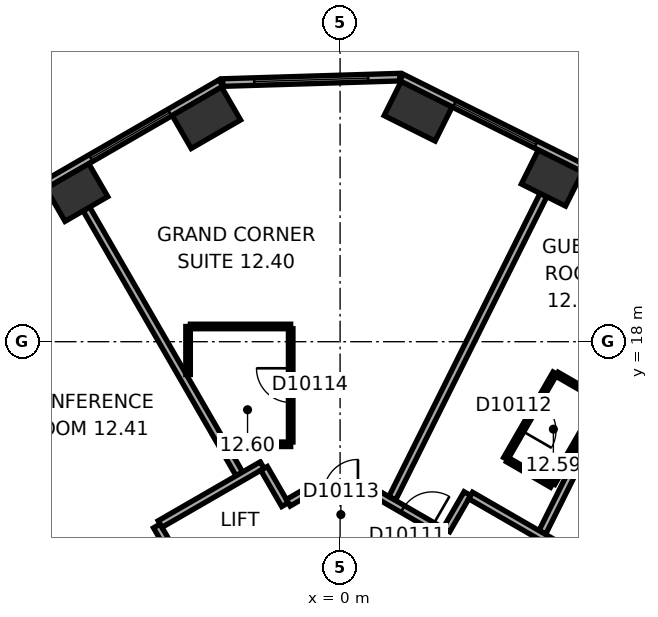
"""IFC4 building model, lengths in metres.
Left out: names, types, materials, properties, quantities, classifications, styles, units other than length and angle.
Written with IfcOpenShell. Run it as: python <this file> out.ifc"""

import sys

from ifc_helpers import new_model, si_unit, direction, frame, frame_2d, origin, origin_2d, place, context, subcontext, project, spatial, rectangle, extrude, element, fill, save


model = new_model("IFC4")
c1 = context("Model", 3, precision=1e-05, world=origin(), true_north=direction((0.0, 1.0)))
c2 = subcontext(c1, "Body", "Model", "MODEL_VIEW")
j1 = project(units=[si_unit("LENGTHUNIT", "METRE"), si_unit("PLANEANGLEUNIT", "RADIAN")], contexts=[c1])
p1 = place(None, origin())
s1 = spatial("IfcSite", under=j1, at=p1, CompositionType="ELEMENT")
p2 = place(p1, origin())
s2 = spatial("IfcBuilding", under=s1, at=p2, CompositionType="ELEMENT")
p3 = place(p2, frame((0.0, 0.0, 60.5)))
s3 = spatial("IfcBuildingStorey", under=s2, at=p3, CompositionType="ELEMENT", Elevation=60.5)
p4 = place(p3, frame((5.574, 22.306, 0.0), z_axis=(0.0, 0.0, 1.0), x_axis=(-0.894934361602, 0.44619781311, 0.0)))
e1 = element("IfcColumn", 1, at=p4, inside=s3, PredefinedType="COLUMN", context=c2, shape_type="SweptSolid", body=[
    extrude(rectangle(XDim=1.3, YDim=1.0, at=origin_2d()), origin(), (0.0, 0.0, 1.0), 3.3),
])
for number, where, z_axis, x_axis in (
    (2, (2.053, 24.062, 0.0), (0.0, 0.0, 1.0), (-0.895, 0.446, 0.0)),
    (3, (-3.518, 23.892, 0.0), (0.0, 0.0, 1.0), (-0.866, -0.5, 0.0)),
):
    element("IfcColumn", number, at=place(p3, frame(where, z_axis=z_axis, x_axis=x_axis)), inside=s3, PredefinedType="COLUMN", context=c2, shape_type="SweptSolid", body=[
        extrude(rectangle(XDim=1.5, YDim=1.0, at=origin_2d()), origin(), (0.0, 0.0, 1.0), 3.3),
    ])
p5 = place(p3, frame((-6.926, 21.925, 0.0), z_axis=(0.0, 0.0, 1.0), x_axis=(-0.866025403784, -0.5, 0.0)))
e4 = element("IfcColumn", 4, at=p5, inside=s3, PredefinedType="COLUMN", context=c2, shape_type="SweptSolid", body=[
    extrude(rectangle(XDim=1.3, YDim=1.0, at=origin_2d()), origin(), (0.0, 0.0, 1.0), 3.3),
])
p6 = place(p3, frame((20.63, 15.47, 0.0), z_axis=(0.0, 0.0, 1.0), x_axis=(-0.894934518609, 0.446197498203, 0.0)))
e5 = element("IfcWall", 5, at=p6, inside=s3, PredefinedType="STANDARD", context=c2, shape_type="SweptSolid", body=[
    extrude(rectangle(XDim=21.246, YDim=0.2, at=frame_2d((10.623, 0.0))), origin(), (0.0, 0.0, 1.0), 3.3),
])
p7 = place(p6, frame((1.553, 0.0, 0.8)))
e6 = element("IfcOpeningElement", 6, at=p7, cuts=e5, PredefinedType="OPENING", context=c2, shape_type="SweptSolid", body=[
    extrude(rectangle(XDim=2.4, YDim=1.7, at=frame_2d((1.2, 0.85))), frame((0.0, 0.11, 0.0), z_axis=(0.0, -1.0, 0.0), x_axis=(1.0, 0.0, 0.0)), (0.0, 0.0, 1.0), 0.22),
])
p8 = place(p6, frame((5.488, 0.0, 0.8)))
e7 = element("IfcOpeningElement", 7, at=p8, cuts=e5, PredefinedType="OPENING", context=c2, shape_type="SweptSolid", body=[
    extrude(rectangle(XDim=2.4, YDim=1.7, at=frame_2d((1.2, 0.85))), frame((0.0, 0.11, 0.0), z_axis=(0.0, -1.0, 0.0), x_axis=(1.0, 0.0, 0.0)), (0.0, 0.0, 1.0), 0.22),
])
p9 = place(p6, frame((9.422, 0.0, 0.8)))
e8 = element("IfcOpeningElement", 8, at=p9, cuts=e5, PredefinedType="OPENING", context=c2, shape_type="SweptSolid", body=[
    extrude(rectangle(XDim=2.4, YDim=1.7, at=frame_2d((1.2, 0.85))), frame((0.0, 0.11, 0.0), z_axis=(0.0, -1.0, 0.0), x_axis=(1.0, 0.0, 0.0)), (0.0, 0.0, 1.0), 0.22),
])
p10 = place(p6, frame((13.357, 0.0, 0.8)))
e9 = element("IfcOpeningElement", 9, at=p10, cuts=e5, PredefinedType="OPENING", context=c2, shape_type="SweptSolid", body=[
    extrude(rectangle(XDim=2.4, YDim=1.7, at=frame_2d((1.2, 0.85))), frame((0.0, 0.11, 0.0), z_axis=(0.0, -1.0, 0.0), x_axis=(1.0, 0.0, 0.0)), (0.0, 0.0, 1.0), 0.22),
])
p11 = place(p6, frame((17.292, 0.0, 0.8)))
e10 = element("IfcOpeningElement", 10, at=p11, cuts=e5, PredefinedType="OPENING", context=c2, shape_type="SweptSolid", body=[
    extrude(rectangle(XDim=2.4, YDim=1.7, at=frame_2d((1.2, 0.85))), frame((0.0, 0.11, 0.0), z_axis=(0.0, -1.0, 0.0), x_axis=(1.0, 0.0, 0.0)), (0.0, 0.0, 1.0), 0.22),
])
p12 = place(p3, frame((1.568, 24.961, 0.0), z_axis=(0.0, 0.0, 1.0), x_axis=(-0.999533359013, -0.030546099927, 0.0)))
e11 = element("IfcWall", 11, at=p12, inside=s3, PredefinedType="STANDARD", context=c2, shape_type="SweptSolid", body=[
    extrude(rectangle(XDim=4.66, YDim=0.2, at=frame_2d((2.33, 0.0))), origin(), (0.0, 0.0, 1.0), 3.3),
])
p13 = place(p12, frame((0.83, 0.0, 0.8)))
e12 = element("IfcOpeningElement", 12, at=p13, cuts=e11, PredefinedType="OPENING", context=c2, shape_type="SweptSolid", body=[
    extrude(rectangle(XDim=3.0, YDim=1.7, at=frame_2d((1.5, 0.85))), frame((0.0, 0.11, 0.0), z_axis=(0.0, -1.0, 0.0), x_axis=(1.0, 0.0, 0.0)), (0.0, 0.0, 1.0), 0.22),
])
p14 = place(p3, frame((-3.136, 24.805, 0.0), z_axis=(0.0, 0.0, 1.0), x_axis=(-0.866028291626, -0.499994998079, 0.0)))
e13 = element("IfcWall", 13, at=p14, inside=s3, PredefinedType="STANDARD", context=c2, shape_type="SweptSolid", body=[
    extrude(rectangle(XDim=21.246, YDim=0.2, at=frame_2d((10.623, 0.0))), origin(), (0.0, 0.0, 1.0), 3.3),
])
p15 = place(p14, frame((1.555, 0.0, 0.8)))
e14 = element("IfcOpeningElement", 14, at=p15, cuts=e13, PredefinedType="OPENING", context=c2, shape_type="SweptSolid", body=[
    extrude(rectangle(XDim=2.4, YDim=1.7, at=frame_2d((1.2, 0.85))), frame((0.0, 0.11, 0.0), z_axis=(0.0, -1.0, 0.0), x_axis=(1.0, 0.0, 0.0)), (0.0, 0.0, 1.0), 0.22),
])
p16 = place(p14, frame((5.489, 0.0, 0.8)))
e15 = element("IfcOpeningElement", 15, at=p16, cuts=e13, PredefinedType="OPENING", context=c2, shape_type="SweptSolid", body=[
    extrude(rectangle(XDim=2.4, YDim=1.7, at=frame_2d((1.2, 0.85))), frame((0.0, 0.11, 0.0), z_axis=(0.0, -1.0, 0.0), x_axis=(1.0, 0.0, 0.0)), (0.0, 0.0, 1.0), 0.22),
])
p17 = place(p14, frame((9.424, 0.0, 0.8)))
e16 = element("IfcOpeningElement", 16, at=p17, cuts=e13, PredefinedType="OPENING", context=c2, shape_type="SweptSolid", body=[
    extrude(rectangle(XDim=2.4, YDim=1.7, at=frame_2d((1.2, 0.85))), frame((0.0, 0.11, 0.0), z_axis=(0.0, -1.0, 0.0), x_axis=(1.0, 0.0, 0.0)), (0.0, 0.0, 1.0), 0.22),
])
p18 = place(p14, frame((13.358, 0.0, 0.8)))
e17 = element("IfcOpeningElement", 17, at=p18, cuts=e13, PredefinedType="OPENING", context=c2, shape_type="SweptSolid", body=[
    extrude(rectangle(XDim=2.4, YDim=1.7, at=frame_2d((1.2, 0.85))), frame((0.0, 0.11, 0.0), z_axis=(0.0, -1.0, 0.0), x_axis=(1.0, 0.0, 0.0)), (0.0, 0.0, 1.0), 0.22),
])
p19 = place(p14, frame((17.293, 0.0, 0.8)))
e18 = element("IfcOpeningElement", 18, at=p19, cuts=e13, PredefinedType="OPENING", context=c2, shape_type="SweptSolid", body=[
    extrude(rectangle(XDim=2.4, YDim=1.7, at=frame_2d((1.2, 0.85))), frame((0.0, 0.11, 0.0), z_axis=(0.0, -1.0, 0.0), x_axis=(1.0, 0.0, 0.0)), (0.0, 0.0, 1.0), 0.22),
])
p20 = place(p3, frame((-6.676, 21.492, 0.0), z_axis=(0.0, 0.0, 1.0), x_axis=(0.500011263043, -0.866018900966, 0.0)))
e19 = element("IfcWall", 19, at=p20, inside=s3, PredefinedType="PARTITIONING", context=c2, shape_type="SweptSolid", body=[
    extrude(rectangle(XDim=8.049, YDim=0.2, at=frame_2d((4.024, 0.0))), origin(), (0.0, 0.0, 1.0), 3.05),
])
p21 = place(p3, frame((-4.823, 13.152, 0.0), z_axis=(0.0, 0.0, 1.0), x_axis=(0.499986357472, -0.866033280158, 0.0)))
e20 = element("IfcWall", 20, at=p21, inside=s3, PredefinedType="PARTITIONING", context=c2, shape_type="SweptSolid", body=[
    extrude(rectangle(XDim=1.201, YDim=0.2, at=frame_2d((0.601, 0.0))), origin(), (0.0, 0.0, 1.0), 3.05),
])
p22 = place(p3, frame((-4.0, 17.137, 0.0), z_axis=(0.0, 0.0, 1.0), x_axis=(0.0, 1.0, 0.0)))
e21 = element("IfcWall", 21, at=p22, inside=s3, PredefinedType="PARTITIONING", context=c2, shape_type="SweptSolid", body=[
    extrude(rectangle(XDim=1.263, YDim=0.12, at=frame_2d((0.632, 0.0))), origin(), (0.0, 0.0, 1.0), 3.05),
])
p23 = place(p3, frame((-3.94, 18.401, 0.0), z_axis=(0.0, 0.0, 1.0), x_axis=(1.0, 0.0, 0.0)))
e22 = element("IfcWall", 22, at=p23, inside=s3, PredefinedType="PARTITIONING", context=c2, shape_type="SweptSolid", body=[
    extrude(rectangle(XDim=2.64, YDim=0.12, at=frame_2d((1.32, 0.0))), origin(), (0.0, 0.0, 1.0), 3.05),
])
p24 = place(p3, frame((-2.05, 14.752, 0.0), z_axis=(0.0, 0.0, 1.0), x_axis=(-0.866030936828, -0.499990416364, 0.0)))
e23 = element("IfcWall", 23, at=p24, inside=s3, PredefinedType="PARTITIONING", context=c2, shape_type="SweptSolid", body=[
    extrude(rectangle(XDim=3.102, YDim=0.2, at=frame_2d((1.551, 0.0))), origin(), (0.0, 0.0, 1.0), 3.05),
])
p25 = place(p3, frame((-1.449, 13.712, 0.0), z_axis=(0.0, 0.0, 1.0), x_axis=(-0.499978356969, 0.866037899034, 0.0)))
e24 = element("IfcWall", 24, at=p25, inside=s3, PredefinedType="PARTITIONING", context=c2, shape_type="SweptSolid", body=[
    extrude(rectangle(XDim=1.101, YDim=0.2, at=frame_2d((0.551, 0.0))), origin(), (0.0, 0.0, 1.0), 3.05),
])
p26 = place(p3, frame((-1.3, 15.301, 0.0), z_axis=(0.0, 0.0, 1.0), x_axis=(-1.0, 0.0, 0.0)))
e25 = element("IfcWall", 25, at=p26, inside=s3, PredefinedType="PARTITIONING", context=c2, shape_type="SweptSolid", body=[
    extrude(rectangle(XDim=1.661, YDim=0.12, at=frame_2d((0.831, 0.0))), origin(), (0.0, 0.0, 1.0), 3.05),
])
p27 = place(p3, frame((-1.3, 18.341, 0.0), z_axis=(0.0, 0.0, 1.0), x_axis=(0.0, -1.0, 0.0)))
e26 = element("IfcWall", 26, at=p27, inside=s3, PredefinedType="PARTITIONING", context=c2, shape_type="SweptSolid", body=[
    extrude(rectangle(XDim=2.98, YDim=0.12, at=frame_2d((1.49, 0.0))), origin(), (0.0, 0.0, 1.0), 3.05),
])
p28 = place(p27, frame((1.04, 0.0, 0.0)))
e27 = element("IfcOpeningElement", 27, at=p28, cuts=e26, PredefinedType="OPENING", context=c2, shape_type="SweptSolid", body=[
    extrude(rectangle(XDim=0.9, YDim=2.1, at=frame_2d((0.45, 1.05))), frame((0.0, 0.07, 0.0), z_axis=(0.0, -1.0, 0.0), x_axis=(1.0, 0.0, 0.0)), (0.0, 0.0, 1.0), 0.14),
])
p29 = place(p3, frame((-0.95, 14.001, 0.0), z_axis=(0.0, 0.0, 1.0), x_axis=(-0.86609177584, -0.499885022602, 0.0)))
e28 = element("IfcWall", 28, at=p29, inside=s3, PredefinedType="PARTITIONING", context=c2, shape_type="SweptSolid", body=[
    extrude(rectangle(XDim=0.477, YDim=0.2, at=frame_2d((0.238, 0.0))), origin(), (0.0, 0.0, 1.0), 3.05),
])
p30 = place(p3, frame((0.95, 14.001, 0.0), z_axis=(0.0, 0.0, 1.0), x_axis=(-1.0, 0.0, 0.0)))
e29 = element("IfcWall", 29, at=p30, inside=s3, PredefinedType="PARTITIONING", context=c2, shape_type="SweptSolid", body=[
    extrude(rectangle(XDim=1.86, YDim=0.2, at=frame_2d((0.93, 0.0))), origin(), (0.0, 0.0, 1.0), 3.05),
])
p31 = place(p30, frame((0.48, 0.0, 0.0)))
e30 = element("IfcOpeningElement", 30, at=p31, cuts=e29, PredefinedType="OPENING", context=c2, shape_type="SweptSolid", body=[
    extrude(rectangle(XDim=0.9, YDim=2.1, at=frame_2d((0.45, 1.05))), frame((0.0, 0.11, 0.0), z_axis=(0.0, -1.0, 0.0), x_axis=(1.0, 0.0, 0.0)), (0.0, 0.0, 1.0), 0.22),
])
p32 = place(p3, frame((2.748, 12.962, 0.0), z_axis=(0.0, 0.0, 1.0), x_axis=(-0.866013897511, 0.50001992892, 0.0)))
e31 = element("IfcWall", 31, at=p32, inside=s3, PredefinedType="PARTITIONING", context=c2, shape_type="SweptSolid", body=[
    extrude(rectangle(XDim=2.037, YDim=0.2, at=frame_2d((1.018, 0.0))), origin(), (0.0, 0.0, 1.0), 3.05),
])
p33 = place(p32, frame((0.372, 0.0, 0.0)))
e32 = element("IfcOpeningElement", 32, at=p33, cuts=e31, PredefinedType="OPENING", context=c2, shape_type="SweptSolid", body=[
    extrude(rectangle(XDim=0.9, YDim=2.1, at=frame_2d((0.45, 1.05))), frame((0.0, 0.11, 0.0), z_axis=(0.0, -1.0, 0.0), x_axis=(1.0, 0.0, 0.0)), (0.0, 0.0, 1.0), 0.22),
])
p34 = place(p3, frame((3.349, 14.002, 0.0), z_axis=(0.0, 0.0, 1.0), x_axis=(-0.500074377092, -0.865982457891, 0.0)))
e33 = element("IfcWall", 33, at=p34, inside=s3, PredefinedType="PARTITIONING", context=c2, shape_type="SweptSolid", body=[
    extrude(rectangle(XDim=1.101, YDim=0.2, at=frame_2d((0.55, 0.0))), origin(), (0.0, 0.0, 1.0), 3.05),
])
p35 = place(p3, frame((4.356, 14.922, 0.0), z_axis=(0.0, 0.0, 1.0), x_axis=(0.499936506574, 0.866062058628, 0.0)))
e34 = element("IfcWall", 34, at=p35, inside=s3, PredefinedType="PARTITIONING", context=c2, shape_type="SweptSolid", body=[
    extrude(rectangle(XDim=2.6, YDim=0.12, at=frame_2d((1.3, 0.0))), origin(), (0.0, 0.0, 1.0), 3.05),
])
p36 = place(p35, frame((0.85, 0.0, 0.0)))
e35 = element("IfcOpeningElement", 35, at=p36, cuts=e34, PredefinedType="OPENING", context=c2, shape_type="SweptSolid", body=[
    extrude(rectangle(XDim=0.9, YDim=2.1, at=frame_2d((0.45, 1.05))), frame((0.0, 0.07, 0.0), z_axis=(0.0, -1.0, 0.0), x_axis=(1.0, 0.0, 0.0)), (0.0, 0.0, 1.0), 0.14),
])
p37 = place(p3, frame((5.351, 21.859, 0.0), z_axis=(0.0, 0.0, 1.0), x_axis=(-0.446205309328, -0.894930624086, 0.0)))
e36 = element("IfcWall", 36, at=p37, inside=s3, PredefinedType="PARTITIONING", context=c2, shape_type="SweptSolid", body=[
    extrude(rectangle(XDim=8.913, YDim=0.2, at=frame_2d((4.457, 0.0))), origin(), (0.0, 0.0, 1.0), 2.6),
])
p38 = place(p3, frame((5.569, 14.222, 0.0), z_axis=(0.0, 0.0, 1.0), x_axis=(-0.866036909293, 0.499980071345, 0.0)))
e37 = element("IfcWall", 37, at=p38, inside=s3, PredefinedType="PARTITIONING", context=c2, shape_type="SweptSolid", body=[
    extrude(rectangle(XDim=1.34, YDim=0.12, at=frame_2d((0.67, 0.0))), origin(), (0.0, 0.0, 1.0), 3.05),
])
p39 = place(p3, frame((5.708, 17.144, 0.0), z_axis=(0.0, 0.0, 1.0), x_axis=(0.866082447003, -0.499901185229, 0.0)))
e38 = element("IfcWall", 38, at=p39, inside=s3, PredefinedType="PARTITIONING", context=c2, shape_type="SweptSolid", body=[
    extrude(rectangle(XDim=1.34, YDim=0.12, at=frame_2d((0.67, 0.0))), origin(), (0.0, 0.0, 1.0), 3.05),
])
p40 = place(p3, frame((6.839, 16.422, 0.0), z_axis=(0.0, 0.0, 1.0), x_axis=(-0.50000366821, -0.866023285932, 0.0)))
e39 = element("IfcWall", 39, at=p40, inside=s3, PredefinedType="PARTITIONING", context=c2, shape_type="SweptSolid", body=[
    extrude(rectangle(XDim=2.48, YDim=0.12, at=frame_2d((1.24, 0.0))), origin(), (0.0, 0.0, 1.0), 3.05),
])
p41 = place(p3, frame((8.872, 20.104, 0.0), z_axis=(0.0, 0.0, 1.0), x_axis=(-0.446218378653, -0.894924107706, 0.0)))
e40 = element("IfcWall", 40, at=p41, inside=s3, PredefinedType="PARTITIONING", context=c2, shape_type="SweptSolid", body=[
    extrude(rectangle(XDim=7.95, YDim=0.2, at=frame_2d((3.975, 0.0))), origin(), (0.0, 0.0, 1.0), 3.05),
])
p42 = place(p3, frame((10.972, 9.602, 0.0), z_axis=(0.0, 0.0, 1.0), x_axis=(-0.866033277307, 0.499986362411, 0.0)))
e41 = element("IfcWall", 41, at=p42, inside=s3, PredefinedType="PARTITIONING", context=c2, shape_type="SweptSolid", body=[
    extrude(rectangle(XDim=8.702, YDim=0.2, at=frame_2d((4.351, 0.0))), origin(), (0.0, 0.0, 1.0), 3.05),
])
p43 = place(p42, frame((4.364, 0.0, 0.0)))
e42 = element("IfcOpeningElement", 42, at=p43, cuts=e41, PredefinedType="OPENING", context=c2, shape_type="SweptSolid", body=[
    extrude(rectangle(XDim=0.9, YDim=2.1, at=frame_2d((0.45, 1.05))), frame((0.0, 0.11, 0.0), z_axis=(0.0, -1.0, 0.0), x_axis=(1.0, 0.0, 0.0)), (0.0, 0.0, 1.0), 0.22),
])
p44 = place(p11, origin())
e43 = element("IfcWindow", 43, at=p44, inside=s3, PartitioningType="SINGLE_PANEL", PredefinedType="WINDOW", context=c2, shape_type="SweptSolid", body=[
    extrude(rectangle(XDim=2.4, YDim=1.7, at=frame_2d((1.2, 0.85))), frame((0.0, 0.03, 0.0), z_axis=(0.0, -1.0, 0.0), x_axis=(1.0, 0.0, 0.0)), (0.0, 0.0, 1.0), 0.06),
])
fill(e10, e43)
p45 = place(p13, origin())
e44 = element("IfcWindow", 44, at=p45, inside=s3, PartitioningType="SINGLE_PANEL", PredefinedType="WINDOW", context=c2, shape_type="SweptSolid", body=[
    extrude(rectangle(XDim=3.0, YDim=1.7, at=frame_2d((1.5, 0.85))), frame((0.0, 0.03, 0.0), z_axis=(0.0, -1.0, 0.0), x_axis=(1.0, 0.0, 0.0)), (0.0, 0.0, 1.0), 0.06),
])
fill(e12, e44)
p46 = place(p15, origin())
e45 = element("IfcWindow", 45, at=p46, inside=s3, PartitioningType="SINGLE_PANEL", PredefinedType="WINDOW", context=c2, shape_type="SweptSolid", body=[
    extrude(rectangle(XDim=2.4, YDim=1.7, at=frame_2d((1.2, 0.85))), frame((0.0, 0.03, 0.0), z_axis=(0.0, -1.0, 0.0), x_axis=(1.0, 0.0, 0.0)), (0.0, 0.0, 1.0), 0.06),
])
fill(e14, e45)
p47 = place(p33, origin())
e46 = element("IfcDoor", 46, at=p47, inside=s3, OperationType="SINGLE_SWING_LEFT", PredefinedType="DOOR", context=c2, shape_type="SweptSolid", body=[
    extrude(rectangle(XDim=0.9, YDim=2.1, at=frame_2d((0.45, 1.05))), frame((0.0, 0.025, 0.0), z_axis=(0.0, -1.0, 0.0), x_axis=(1.0, 0.0, 0.0)), (0.0, 0.0, 1.0), 0.05),
])
fill(e32, e46)
p48 = place(p36, origin())
e47 = element("IfcDoor", 47, at=p48, inside=s3, OperationType="SINGLE_SWING_LEFT", PredefinedType="DOOR", context=c2, shape_type="SweptSolid", body=[
    extrude(rectangle(XDim=0.9, YDim=2.1, at=frame_2d((0.45, 1.05))), frame((0.0, 0.025, 0.0), z_axis=(0.0, -1.0, 0.0), x_axis=(1.0, 0.0, 0.0)), (0.0, 0.0, 1.0), 0.05),
])
fill(e35, e47)
p49 = place(p31, origin())
e48 = element("IfcDoor", 48, at=p49, inside=s3, OperationType="SINGLE_SWING_LEFT", PredefinedType="DOOR", context=c2, shape_type="SweptSolid", body=[
    extrude(rectangle(XDim=0.9, YDim=2.1, at=frame_2d((0.45, 1.05))), frame((0.0, 0.025, 0.0), z_axis=(0.0, -1.0, 0.0), x_axis=(1.0, 0.0, 0.0)), (0.0, 0.0, 1.0), 0.05),
])
fill(e30, e48)
p50 = place(p28, origin())
e49 = element("IfcDoor", 49, at=p50, inside=s3, OperationType="SINGLE_SWING_LEFT", PredefinedType="DOOR", context=c2, shape_type="SweptSolid", body=[
    extrude(rectangle(XDim=0.9, YDim=2.1, at=frame_2d((0.45, 1.05))), frame((0.0, 0.025, 0.0), z_axis=(0.0, -1.0, 0.0), x_axis=(1.0, 0.0, 0.0)), (0.0, 0.0, 1.0), 0.05),
])
fill(e27, e49)
save(model, sys.argv[1])
